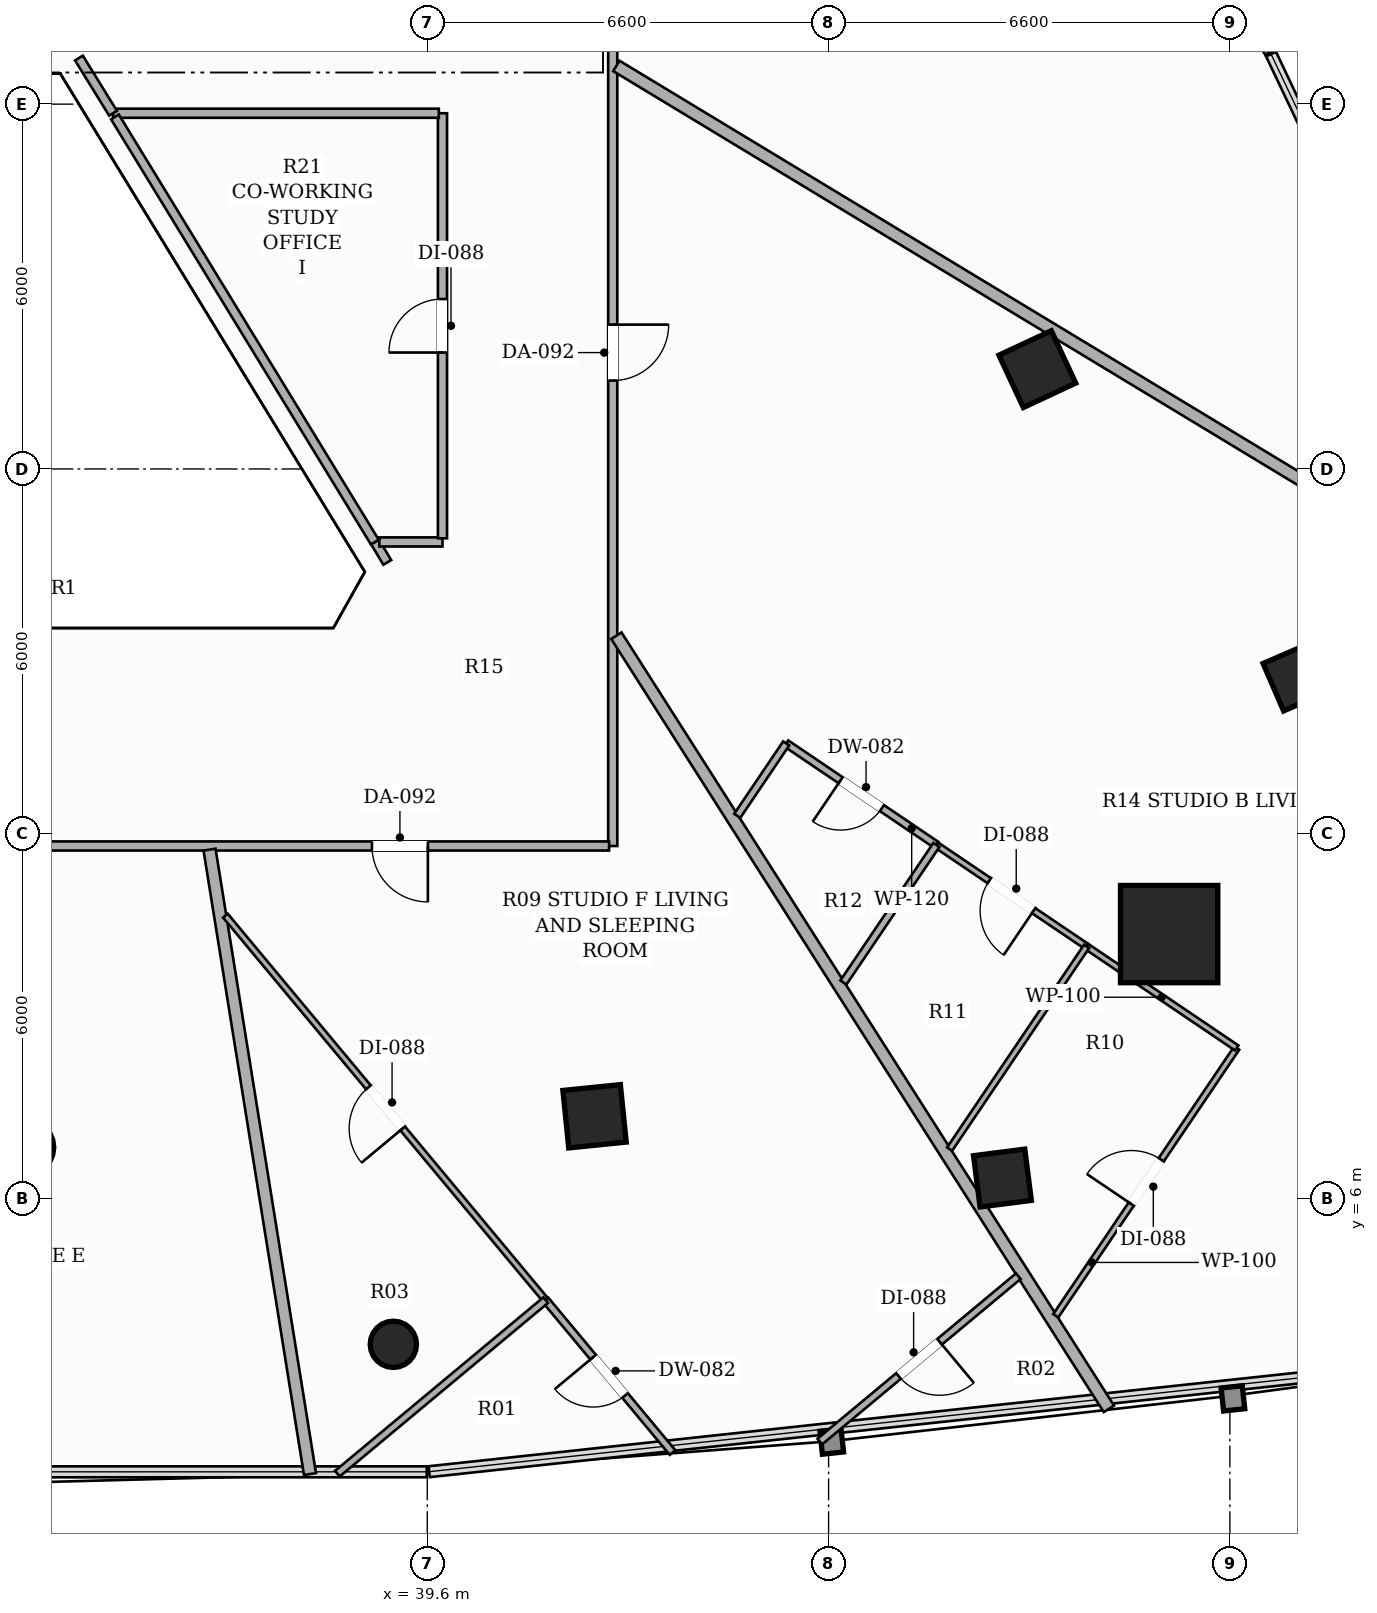
"""IFC4 building model, lengths in metres.
Left out: names, types, materials, properties, quantities, classifications, styles, units other than length and angle.
Written with IfcOpenShell. Run it as: python <this file> out.ifc"""

import sys

from ifc_helpers import new_model, si_unit, direction, frame, frame_2d, origin, origin_2d, place, context, subcontext, project, spatial, rectangle, hollow_rectangle, hollow_circle, extrude, element, fill, save


model = new_model("IFC4")
c1 = context("Model", 3, precision=1e-05, world=origin(), true_north=direction((0.0, 1.0)))
c2 = subcontext(c1, "Body", "Model", "MODEL_VIEW")
j1 = project(units=[si_unit("LENGTHUNIT", "METRE"), si_unit("PLANEANGLEUNIT", "RADIAN")], contexts=[c1])
p1 = place(None, origin())
s1 = spatial("IfcSite", under=j1, at=p1, CompositionType="ELEMENT")
p2 = place(p1, origin())
s2 = spatial("IfcBuilding", under=s1, at=p2, CompositionType="ELEMENT")
p3 = place(p2, frame((0.0, 0.0, 43.4)))
s3 = spatial("IfcBuildingStorey", under=s2, at=p3, CompositionType="ELEMENT", Elevation=43.4)
p4 = place(p3, frame((51.801, 10.351, 0.0), z_axis=(0.0, 0.0, 1.0), x_axis=(1.0, 0.0, 0.0)))
e1 = element("IfcColumn", 1, at=p4, inside=s3, PredefinedType="COLUMN", context=c2, shape_type="SweptSolid", body=[
    extrude(hollow_rectangle(XDim=1.6, YDim=1.6, WallThickness=0.05, at=origin_2d()), origin(), (0.0, 0.0, 1.0), 3.3),
])
p5 = place(p3, frame((33.0, 6.844, 0.0), z_axis=(0.0, 0.0, 1.0), x_axis=(1.0, 0.0, 0.0)))
e2 = element("IfcColumn", 2, at=p5, inside=s3, PredefinedType="COLUMN", context=c2, shape_type="SweptSolid", body=[
    extrude(hollow_circle(Radius=0.457, WallThickness=0.025, at=origin_2d()), origin(), (0.0, 0.0, 1.0), 3.3),
])
for number, where, z_axis, x_axis in (
    (3, (42.351, 7.355, 0.0), (0.0, 0.0, 1.0), (0.995, 0.101, 0.0)),
    (4, (49.633, 19.642, 0.0), (0.0, 0.0, 1.0), (-0.423, 0.906, 0.0)),
):
    element("IfcColumn", number, at=place(p3, frame(where, z_axis=z_axis, x_axis=x_axis)), inside=s3, PredefinedType="COLUMN", context=c2, shape_type="SweptSolid", body=[
        extrude(hollow_rectangle(XDim=0.95, YDim=0.95, WallThickness=0.032, at=origin_2d()), origin(), (0.0, 0.0, 1.0), 3.3),
    ])
for number, where, z_axis, x_axis in (
    (5, (49.059, 6.339, 0.0), (0.0, 0.0, 1.0), (0.992, 0.127, 0.0)),
    (6, (53.905, 14.58, 0.0), (0.0, 0.0, 1.0), (-0.397, 0.918, 0.0)),
):
    element("IfcColumn", number, at=place(p3, frame(where, z_axis=z_axis, x_axis=x_axis)), inside=s3, PredefinedType="COLUMN", context=c2, shape_type="SweptSolid", body=[
        extrude(hollow_rectangle(XDim=0.85, YDim=0.85, WallThickness=0.028, at=origin_2d()), origin(), (0.0, 0.0, 1.0), 3.3),
    ])
p6 = place(p3, frame((39.042, 3.605, 0.0), z_axis=(0.0, 0.0, 1.0), x_axis=(1.0, 0.0, 0.0)))
e7 = element("IfcColumn", 7, at=p6, inside=s3, PredefinedType="COLUMN", context=c2, shape_type="SweptSolid", body=[
    extrude(hollow_circle(Radius=0.381, WallThickness=0.022, at=origin_2d()), origin(), (0.0, 0.0, 1.0), 3.3),
])
p7 = place(p3, frame((42.65, 36.84, 0.0), z_axis=(0.0, 0.0, 1.0), x_axis=(0.0, -1.0, 0.0)))
e8 = element("IfcWall", 8, at=p7, inside=s3, PredefinedType="PARTITIONING", context=c2, shape_type="SweptSolid", body=[
    extrude(rectangle(XDim=25.04, YDim=0.15, at=frame_2d((12.52, 0.0))), origin(), (0.0, 0.0, 1.0), 2.413),
])
p8 = place(p7, frame((16.466, 0.0, 0.0)))
e9 = element("IfcOpeningElement", 9, at=p8, cuts=e8, PredefinedType="OPENING", context=c2, shape_type="SweptSolid", body=[
    extrude(rectangle(XDim=0.92, YDim=2.15, at=frame_2d((0.46, 1.075))), frame((0.0, 0.085, 0.0), z_axis=(0.0, -1.0, 0.0), x_axis=(1.0, 0.0, 0.0)), (0.0, 0.0, 1.0), 0.17),
])
p9 = place(p7, frame((5.796, 0.0, 0.0)))
e10 = element("IfcOpeningElement", 10, at=p9, cuts=e8, PredefinedType="OPENING", context=c2, shape_type="SweptSolid", body=[
    extrude(rectangle(XDim=0.92, YDim=2.15, at=frame_2d((0.46, 1.075))), frame((0.0, 0.085, 0.0), z_axis=(0.0, -1.0, 0.0), x_axis=(1.0, 0.0, 0.0)), (0.0, 0.0, 1.0), 0.17),
])
p10 = place(p3, frame((42.59, 11.8, 0.0), z_axis=(0.0, 0.0, 1.0), x_axis=(-1.0, 0.0, 0.0)))
e11 = element("IfcWall", 11, at=p10, inside=s3, PredefinedType="PARTITIONING", context=c2, shape_type="SweptSolid", body=[
    extrude(rectangle(XDim=19.24, YDim=0.15, at=frame_2d((9.62, 0.0))), origin(), (0.0, 0.0, 1.0), 2.669),
])
p11 = place(p10, frame((10.508, 0.0, 0.0)))
e12 = element("IfcOpeningElement", 12, at=p11, cuts=e11, PredefinedType="OPENING", context=c2, shape_type="SweptSolid", body=[
    extrude(rectangle(XDim=0.88, YDim=2.1, at=frame_2d((0.44, 1.05))), frame((0.0, 0.085, 0.0), z_axis=(0.0, -1.0, 0.0), x_axis=(1.0, 0.0, 0.0)), (0.0, 0.0, 1.0), 0.17),
])
p12 = place(p10, frame((2.98, 0.0, 0.0)))
e13 = element("IfcOpeningElement", 13, at=p12, cuts=e11, PredefinedType="OPENING", context=c2, shape_type="SweptSolid", body=[
    extrude(rectangle(XDim=0.92, YDim=2.15, at=frame_2d((0.46, 1.075))), frame((0.0, 0.085, 0.0), z_axis=(0.0, -1.0, 0.0), x_axis=(1.0, 0.0, 0.0)), (0.0, 0.0, 1.0), 0.17),
])
p13 = place(p3, frame((38.942, 16.463, 0.0), z_axis=(0.0, 0.0, 1.0), x_axis=(-0.511932152937, 0.859025884819, 0.0)))
e14 = element("IfcWall", 14, at=p13, inside=s3, PredefinedType="PARTITIONING", context=c2, shape_type="SweptSolid", body=[
    extrude(rectangle(XDim=0.393, YDim=0.15, at=frame_2d((0.196, 0.0))), origin(), (0.0, 0.0, 1.0), 3.06),
])
p14 = place(p3, frame((38.811, 16.8, 0.0), z_axis=(0.0, 0.0, 1.0), x_axis=(1.0, 0.0, 0.0)))
e15 = element("IfcWall", 15, at=p14, inside=s3, PredefinedType="PARTITIONING", context=c2, shape_type="SweptSolid", body=[
    extrude(rectangle(XDim=1.039, YDim=0.15, at=frame_2d((0.52, 0.0))), origin(), (0.0, 0.0, 1.0), 3.06),
])
p15 = place(p3, frame((39.85, 16.86, 0.0), z_axis=(0.0, 0.0, 1.0), x_axis=(0.0, 1.0, 0.0)))
e16 = element("IfcWall", 16, at=p15, inside=s3, PredefinedType="PARTITIONING", context=c2, shape_type="SweptSolid", body=[
    extrude(rectangle(XDim=6.99, YDim=0.15, at=frame_2d((3.495, 0.0))), origin(), (0.0, 0.0, 1.0), 2.669),
])
p16 = place(p15, frame((3.055, 0.0, 0.0)))
e17 = element("IfcOpeningElement", 17, at=p16, cuts=e16, PredefinedType="OPENING", context=c2, shape_type="SweptSolid", body=[
    extrude(rectangle(XDim=0.88, YDim=2.1, at=frame_2d((0.44, 1.05))), frame((0.0, 0.085, 0.0), z_axis=(0.0, -1.0, 0.0), x_axis=(1.0, 0.0, 0.0)), (0.0, 0.0, 1.0), 0.17),
])
p17 = place(p3, frame((39.79, 23.85, 0.0), z_axis=(0.0, 0.0, 1.0), x_axis=(-1.0, 0.0, 0.0)))
e18 = element("IfcWall", 18, at=p17, inside=s3, PredefinedType="PARTITIONING", context=c2, shape_type="SweptSolid", body=[
    extrude(rectangle(XDim=5.358, YDim=0.15, at=frame_2d((2.679, 0.0))), origin(), (0.0, 0.0, 1.0), 2.669),
])
p18 = place(p3, frame((34.432, 23.85, 0.0), z_axis=(0.0, 0.0, 1.0), x_axis=(-0.525488010188, 0.850801005611, 0.0)))
e19 = element("IfcWall", 19, at=p18, inside=s3, PredefinedType="PARTITIONING", context=c2, shape_type="SweptSolid", body=[
    extrude(rectangle(XDim=1.067, YDim=0.15, at=frame_2d((0.534, 0.0))), origin(), (0.0, 0.0, 1.0), 3.06),
])
p19 = place(p3, frame((34.463, 23.79, 0.0), z_axis=(0.0, 0.0, 1.0), x_axis=(0.521566895949, -0.853210392019, 0.0)))
e20 = element("IfcWall", 20, at=p19, inside=s3, PredefinedType="PARTITIONING", context=c2, shape_type="SweptSolid", body=[
    extrude(rectangle(XDim=8.195, YDim=0.15, at=frame_2d((4.097, 0.0))), origin(), (0.0, 0.0, 1.0), 2.669),
])
p20 = place(p3, frame((42.71, 24.628, 0.0), z_axis=(0.0, 0.0, 1.0), x_axis=(0.85570509792, -0.517463801047, 0.0)))
e21 = element("IfcWall", 21, at=p20, inside=s3, PredefinedType="PARTITIONING", context=c2, shape_type="SweptSolid", body=[
    extrude(rectangle(XDim=17.86, YDim=0.2, at=frame_2d((8.93, 0.0))), origin(), (0.0, 0.0, 1.0), 2.413),
])
p21 = place(p3, frame((50.81, 2.544, 0.0), z_axis=(0.0, 0.0, 1.0), x_axis=(-0.537314491885, 0.843381963769, 0.0)))
e22 = element("IfcWall", 22, at=p21, inside=s3, PredefinedType="PARTITIONING", context=c2, shape_type="SweptSolid", body=[
    extrude(rectangle(XDim=15.075, YDim=0.2, at=frame_2d((7.538, 0.0))), origin(), (0.0, 0.0, 1.0), 2.413),
])
p22 = place(p3, frame((36.019, 11.74, 0.0), z_axis=(0.0, 0.0, 1.0), x_axis=(0.158816201081, -0.98730816581, 0.0)))
e23 = element("IfcWall", 23, at=p22, inside=s3, PredefinedType="PARTITIONING", context=c2, shape_type="SweptSolid", body=[
    extrude(rectangle(XDim=10.401, YDim=0.2, at=frame_2d((5.201, 0.0))), origin(), (0.0, 0.0, 1.0), 2.413),
])
p23 = place(p3, frame((47.973, 11.817, 0.0), z_axis=(0.0, 0.0, 1.0), x_axis=(-0.82839181121, 0.560149093653, 0.0)))
e24 = element("IfcWall", 24, at=p23, inside=s3, PredefinedType="PARTITIONING", context=c2, shape_type="SweptSolid", body=[
    extrude(rectangle(XDim=2.982, YDim=0.12, at=frame_2d((1.491, 0.0))), origin(), (0.0, 0.0, 1.0), 2.669),
])
p24 = place(p23, frame((1.081, 0.0, 0.0)))
e25 = element("IfcOpeningElement", 25, at=p24, cuts=e24, PredefinedType="OPENING", context=c2, shape_type="SweptSolid", body=[
    extrude(rectangle(XDim=0.82, YDim=2.1, at=frame_2d((0.41, 1.05))), frame((0.0, 0.07, 0.0), z_axis=(0.0, -1.0, 0.0), x_axis=(1.0, 0.0, 0.0)), (0.0, 0.0, 1.0), 0.14),
])
p25 = place(p3, frame((45.503, 13.487, 0.0), z_axis=(0.0, 0.0, 1.0), x_axis=(-0.559901526605, -0.828559159328, 0.0)))
e26 = element("IfcWall", 26, at=p25, inside=s3, PredefinedType="PARTITIONING", context=c2, shape_type="SweptSolid", body=[
    extrude(rectangle(XDim=1.438, YDim=0.12, at=frame_2d((0.719, 0.0))), origin(), (0.0, 0.0, 1.0), 2.669),
])
p26 = place(p3, frame((49.936, 4.074, 0.0), z_axis=(0.0, 0.0, 1.0), x_axis=(0.560030395854, 0.828472060917, 0.0)))
e27 = element("IfcWall", 27, at=p26, inside=s3, PredefinedType="PARTITIONING", context=c2, shape_type="SweptSolid", body=[
    extrude(rectangle(XDim=5.316, YDim=0.1, at=frame_2d((2.658, 0.0))), origin(), (0.0, 0.0, 1.0), 3.06),
])
p27 = place(p26, frame((2.218, 0.0, 0.0)))
e28 = element("IfcOpeningElement", 28, at=p27, cuts=e27, PredefinedType="OPENING", context=c2, shape_type="SweptSolid", body=[
    extrude(rectangle(XDim=0.88, YDim=2.1, at=frame_2d((0.44, 1.05))), frame((0.0, 0.06, 0.0), z_axis=(0.0, -1.0, 0.0), x_axis=(1.0, 0.0, 0.0)), (0.0, 0.0, 1.0), 0.12),
])
p28 = place(p3, frame((52.913, 8.478, 0.0), z_axis=(0.0, 0.0, 1.0), x_axis=(-0.828429805787, 0.560092900226, 0.0)))
e29 = element("IfcWall", 29, at=p28, inside=s3, PredefinedType="PARTITIONING", context=c2, shape_type="SweptSolid", body=[
    extrude(rectangle(XDim=2.981, YDim=0.1, at=frame_2d((1.491, 0.0))), origin(), (0.0, 0.0, 1.0), 2.413),
])
p29 = place(p3, frame((50.443, 10.148, 0.0), z_axis=(0.0, 0.0, 1.0), x_axis=(-0.828607449923, 0.559830058082, 0.0)))
e30 = element("IfcWall", 30, at=p29, inside=s3, PredefinedType="PARTITIONING", context=c2, shape_type="SweptSolid", body=[
    extrude(rectangle(XDim=2.981, YDim=0.1, at=frame_2d((1.491, 0.0))), origin(), (0.0, 0.0, 1.0), 3.06),
])
p30 = place(p29, frame((1.051, 0.0, 0.0)))
e31 = element("IfcOpeningElement", 31, at=p30, cuts=e30, PredefinedType="OPENING", context=c2, shape_type="SweptSolid", body=[
    extrude(rectangle(XDim=0.88, YDim=2.1, at=frame_2d((0.44, 1.05))), frame((0.0, 0.06, 0.0), z_axis=(0.0, -1.0, 0.0), x_axis=(1.0, 0.0, 0.0)), (0.0, 0.0, 1.0), 0.12),
])
p31 = place(p3, frame((47.973, 11.817, 0.0), z_axis=(0.0, 0.0, 1.0), x_axis=(-0.559971898906, -0.828511600665, 0.0)))
e32 = element("IfcWall", 32, at=p31, inside=s3, PredefinedType="PARTITIONING", context=c2, shape_type="SweptSolid", body=[
    extrude(rectangle(XDim=2.73, YDim=0.12, at=frame_2d((1.365, 0.0))), origin(), (0.0, 0.0, 1.0), 2.669),
])
p32 = place(p3, frame((48.19, 6.815, 0.0), z_axis=(0.0, 0.0, 1.0), x_axis=(0.560052199206, 0.828457321873, 0.0)))
e33 = element("IfcWall", 33, at=p32, inside=s3, PredefinedType="PARTITIONING", context=c2, shape_type="SweptSolid", body=[
    extrude(rectangle(XDim=4.023, YDim=0.1, at=frame_2d((2.012, 0.0))), origin(), (0.0, 0.0, 1.0), 2.413),
])
p33 = place(p3, frame((43.634, 1.825, 0.0), z_axis=(0.0, 0.0, 1.0), x_axis=(-0.639911914418, 0.768448268777, 0.0)))
e34 = element("IfcWall", 34, at=p33, inside=s3, PredefinedType="PARTITIONING", context=c2, shape_type="SweptSolid", body=[
    extrude(rectangle(XDim=3.261, YDim=0.12, at=frame_2d((1.631, 0.0))), origin(), (0.0, 0.0, 1.0), 3.06),
])
p34 = place(p33, frame((1.221, 0.0, 0.0)))
e35 = element("IfcOpeningElement", 35, at=p34, cuts=e34, PredefinedType="OPENING", context=c2, shape_type="SweptSolid", body=[
    extrude(rectangle(XDim=0.82, YDim=2.1, at=frame_2d((0.41, 1.05))), frame((0.0, 0.07, 0.0), z_axis=(0.0, -1.0, 0.0), x_axis=(1.0, 0.0, 0.0)), (0.0, 0.0, 1.0), 0.14),
])
p35 = place(p3, frame((49.32, 4.725, 0.0), z_axis=(0.0, 0.0, 1.0), x_axis=(-0.768353158093, -0.640026112317, 0.0)))
e36 = element("IfcWall", 36, at=p35, inside=s3, PredefinedType="PARTITIONING", context=c2, shape_type="SweptSolid", body=[
    extrude(rectangle(XDim=4.248, YDim=0.12, at=frame_2d((2.124, 0.0))), origin(), (0.0, 0.0, 1.0), 3.06),
])
p36 = place(p35, frame((1.684, 0.0, 0.0)))
e37 = element("IfcOpeningElement", 37, at=p36, cuts=e36, PredefinedType="OPENING", context=c2, shape_type="SweptSolid", body=[
    extrude(rectangle(XDim=0.88, YDim=2.1, at=frame_2d((0.44, 1.05))), frame((0.0, 0.07, 0.0), z_axis=(0.0, -1.0, 0.0), x_axis=(1.0, 0.0, 0.0)), (0.0, 0.0, 1.0), 0.14),
])
p37 = place(p3, frame((41.547, 4.331, 0.0), z_axis=(0.0, 0.0, 1.0), x_axis=(-0.640035566376, 0.768345282913, 0.0)))
e38 = element("IfcWall", 38, at=p37, inside=s3, PredefinedType="PARTITIONING", context=c2, shape_type="SweptSolid", body=[
    extrude(rectangle(XDim=8.229, YDim=0.1, at=frame_2d((4.115, 0.0))), origin(), (0.0, 0.0, 1.0), 2.413),
])
p38 = place(p37, frame((3.675, 0.0, 0.0)))
e39 = element("IfcOpeningElement", 39, at=p38, cuts=e38, PredefinedType="OPENING", context=c2, shape_type="SweptSolid", body=[
    extrude(rectangle(XDim=0.88, YDim=2.1, at=frame_2d((0.44, 1.05))), frame((0.0, 0.06, 0.0), z_axis=(0.0, -1.0, 0.0), x_axis=(1.0, 0.0, 0.0)), (0.0, 0.0, 1.0), 0.12),
])
p39 = place(p3, frame((38.122, 1.478, 0.0), z_axis=(0.0, 0.0, 1.0), x_axis=(0.768351451836, 0.640028160678, 0.0)))
e40 = element("IfcWall", 40, at=p39, inside=s3, PredefinedType="PARTITIONING", context=c2, shape_type="SweptSolid", body=[
    extrude(rectangle(XDim=4.458, YDim=0.12, at=frame_2d((2.229, 0.0))), origin(), (0.0, 0.0, 1.0), 3.06),
])
p40 = place(p8, origin())
e41 = element("IfcDoor", 41, at=p40, inside=s3, OperationType="SINGLE_SWING_LEFT", PredefinedType="DOOR", context=c2, shape_type="SweptSolid", body=[
    extrude(rectangle(XDim=0.92, YDim=2.15, at=frame_2d((0.46, 1.075))), frame((0.0, 0.025, 0.0), z_axis=(0.0, -1.0, 0.0), x_axis=(1.0, 0.0, 0.0)), (0.0, 0.0, 1.0), 0.05),
])
fill(e9, e41)
p41 = place(p24, origin())
e42 = element("IfcDoor", 42, at=p41, inside=s3, OperationType="SINGLE_SWING_RIGHT", PredefinedType="DOOR", context=c2, shape_type="SweptSolid", body=[
    extrude(rectangle(XDim=0.82, YDim=2.1, at=frame_2d((0.41, 1.05))), frame((0.0, 0.025, 0.0), z_axis=(0.0, -1.0, 0.0), x_axis=(1.0, 0.0, 0.0)), (0.0, 0.0, 1.0), 0.05),
])
fill(e25, e42)
p42 = place(p27, origin())
e43 = element("IfcDoor", 43, at=p42, inside=s3, OperationType="SINGLE_SWING_LEFT", PredefinedType="DOOR", context=c2, shape_type="SweptSolid", body=[
    extrude(rectangle(XDim=0.88, YDim=2.1, at=frame_2d((0.44, 1.05))), frame((0.0, 0.025, 0.0), z_axis=(0.0, -1.0, 0.0), x_axis=(1.0, 0.0, 0.0)), (0.0, 0.0, 1.0), 0.05),
])
fill(e28, e43)
p43 = place(p30, origin())
e44 = element("IfcDoor", 44, at=p43, inside=s3, OperationType="SINGLE_SWING_LEFT", PredefinedType="DOOR", context=c2, shape_type="SweptSolid", body=[
    extrude(rectangle(XDim=0.88, YDim=2.1, at=frame_2d((0.44, 1.05))), frame((0.0, 0.025, 0.0), z_axis=(0.0, -1.0, 0.0), x_axis=(1.0, 0.0, 0.0)), (0.0, 0.0, 1.0), 0.05),
])
fill(e31, e44)
p44 = place(p12, origin())
e45 = element("IfcDoor", 45, at=p44, inside=s3, OperationType="SINGLE_SWING_LEFT", PredefinedType="DOOR", context=c2, shape_type="SweptSolid", body=[
    extrude(rectangle(XDim=0.92, YDim=2.15, at=frame_2d((0.46, 1.075))), frame((0.0, 0.025, 0.0), z_axis=(0.0, -1.0, 0.0), x_axis=(1.0, 0.0, 0.0)), (0.0, 0.0, 1.0), 0.05),
])
fill(e13, e45)
p45 = place(p34, origin())
e46 = element("IfcDoor", 46, at=p45, inside=s3, OperationType="SINGLE_SWING_RIGHT", PredefinedType="DOOR", context=c2, shape_type="SweptSolid", body=[
    extrude(rectangle(XDim=0.82, YDim=2.1, at=frame_2d((0.41, 1.05))), frame((0.0, 0.025, 0.0), z_axis=(0.0, -1.0, 0.0), x_axis=(1.0, 0.0, 0.0)), (0.0, 0.0, 1.0), 0.05),
])
fill(e35, e46)
p46 = place(p36, origin())
e47 = element("IfcDoor", 47, at=p46, inside=s3, OperationType="SINGLE_SWING_LEFT", PredefinedType="DOOR", context=c2, shape_type="SweptSolid", body=[
    extrude(rectangle(XDim=0.88, YDim=2.1, at=frame_2d((0.44, 1.05))), frame((0.0, 0.025, 0.0), z_axis=(0.0, -1.0, 0.0), x_axis=(1.0, 0.0, 0.0)), (0.0, 0.0, 1.0), 0.05),
])
fill(e37, e47)
p47 = place(p38, origin())
e48 = element("IfcDoor", 48, at=p47, inside=s3, OperationType="SINGLE_SWING_LEFT", PredefinedType="DOOR", context=c2, shape_type="SweptSolid", body=[
    extrude(rectangle(XDim=0.88, YDim=2.1, at=frame_2d((0.44, 1.05))), frame((0.0, 0.025, 0.0), z_axis=(0.0, -1.0, 0.0), x_axis=(1.0, 0.0, 0.0)), (0.0, 0.0, 1.0), 0.05),
])
fill(e39, e48)
p48 = place(p16, origin())
e49 = element("IfcDoor", 49, at=p48, inside=s3, OperationType="SINGLE_SWING_LEFT", PredefinedType="DOOR", context=c2, shape_type="SweptSolid", body=[
    extrude(rectangle(XDim=0.88, YDim=2.1, at=frame_2d((0.44, 1.05))), frame((0.0, 0.025, 0.0), z_axis=(0.0, -1.0, 0.0), x_axis=(1.0, 0.0, 0.0)), (0.0, 0.0, 1.0), 0.05),
])
fill(e17, e49)
save(model, sys.argv[1])
